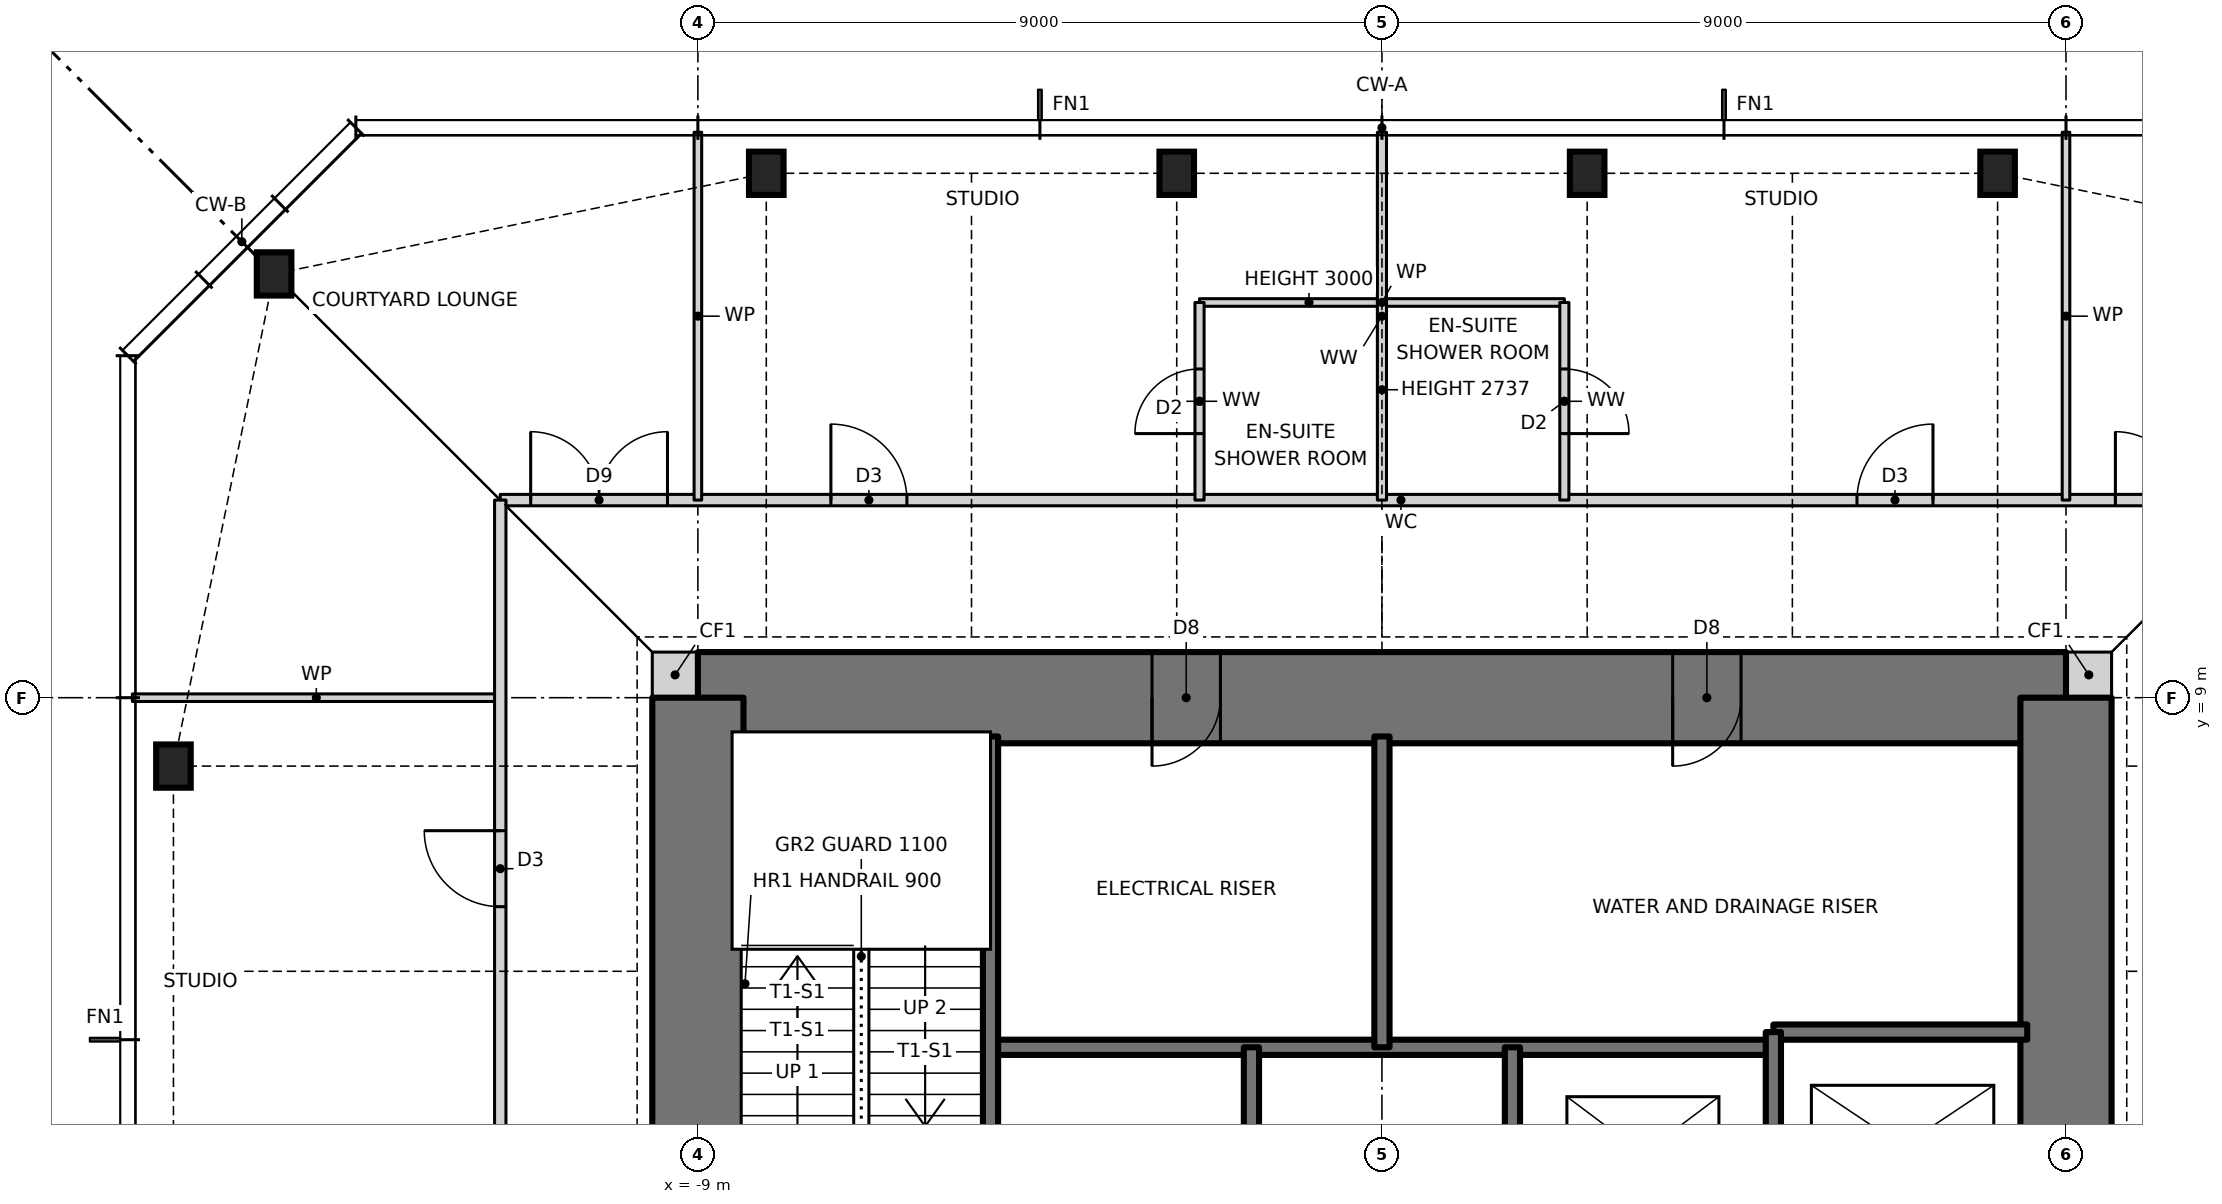
"""IFC4 building model, lengths in metres.
Left out: names, types, materials, properties, quantities, classifications, styles, units other than length and angle.
Written with IfcOpenShell. Run it as: python <this file> out.ifc"""

import sys

from ifc_helpers import new_model, si_unit, direction, frame, frame_2d, origin, origin_2d, place, context, subcontext, project, spatial, rectangle, i_section, extrude, element, fill, save


model = new_model("IFC4")
c1 = context("Model", 3, precision=1e-05, world=origin(), true_north=direction((0.0, 1.0)))
c2 = subcontext(c1, "Body", "Model", "MODEL_VIEW")
j1 = project(units=[si_unit("LENGTHUNIT", "METRE"), si_unit("PLANEANGLEUNIT", "RADIAN")], contexts=[c1])
p1 = place(None, origin())
s1 = spatial("IfcSite", under=j1, at=p1, CompositionType="ELEMENT")
p2 = place(p1, origin())
s2 = spatial("IfcBuilding", under=s1, at=p2, CompositionType="ELEMENT")
p3 = place(p2, frame((0.0, 0.0, 250.0)))
s3 = spatial("IfcBuildingStorey", under=s2, at=p3, CompositionType="ELEMENT", Elevation=250.0)
for number, where, z_axis, x_axis in (
    (1, (8.1, 15.9, 0.0), (0.0, 0.0, 1.0), (1.0, 0.0, 0.0)),
    (2, (2.7, 15.9, 0.0), (0.0, 0.0, 1.0), (1.0, 0.0, 0.0)),
    (3, (-2.7, 15.9, 0.0), (0.0, 0.0, 1.0), (1.0, 0.0, 0.0)),
    (4, (-8.1, 15.9, 0.0), (0.0, 0.0, 1.0), (1.0, 0.0, 0.0)),
    (5, (-14.576, 14.576, 0.0), (0.0, 0.0, 1.0), (1.0, 0.0, 0.0)),
    (6, (-15.9, 8.1, 0.0), (0.0, 0.0, 1.0), (1.0, 0.0, 0.0)),
):
    element("IfcColumn", number, at=place(p3, frame(where, z_axis=z_axis, x_axis=x_axis)), inside=s3, PredefinedType="COLUMN", context=c2, shape_type="SweptSolid", body=[
        extrude(i_section(OverallWidth=0.455, OverallDepth=0.569, WebThickness=0.078, FlangeThickness=0.125, at=origin_2d()), origin(), (0.0, 0.0, 1.0), 3.5),
    ])
for number, where, z_axis, x_axis in (
    (7, (9.0, 9.3, 0.0), (0.0, 0.0, 1.0), (1.0, 0.0, 0.0)),
    (8, (-9.6, 9.3, 0.0), (0.0, 0.0, 1.0), (1.0, 0.0, 0.0)),
):
    element("IfcWall", number, at=place(p3, frame(where, z_axis=z_axis, x_axis=x_axis)), inside=s3, PredefinedType="SOLIDWALL", context=c2, shape_type="SweptSolid", body=[
        extrude(rectangle(XDim=0.6, YDim=0.6, at=frame_2d((0.3, 0.0))), origin(), (0.0, 0.0, 1.0), 3.5),
    ])
p4 = place(p3, frame((9.0, 9.0, 0.0), z_axis=(0.0, 0.0, 1.0), x_axis=(-1.0, 0.0, 0.0)))
e9 = element("IfcWall", 9, at=p4, inside=s3, PredefinedType="SHEAR", context=c2, shape_type="SweptSolid", body=[
    extrude(rectangle(XDim=18.0, YDim=1.2, at=frame_2d((9.0, 0.0))), origin(), (0.0, 0.0, 1.0), 3.5),
])
p5 = place(p4, frame((11.125, 0.0, 0.0)))
e10 = element("IfcOpeningElement", 10, at=p5, cuts=e9, PredefinedType="OPENING", context=c2, shape_type="SweptSolid", body=[
    extrude(rectangle(XDim=0.9, YDim=2.1, at=frame_2d((0.45, 1.05))), frame((0.0, 0.61, 0.0), z_axis=(0.0, -1.0, 0.0), x_axis=(1.0, 0.0, 0.0)), (0.0, 0.0, 1.0), 1.22),
])
p6 = place(p4, frame((4.275, 0.0, 0.0)))
e11 = element("IfcOpeningElement", 11, at=p6, cuts=e9, PredefinedType="OPENING", context=c2, shape_type="SweptSolid", body=[
    extrude(rectangle(XDim=0.9, YDim=2.1, at=frame_2d((0.45, 1.05))), frame((0.0, 0.61, 0.0), z_axis=(0.0, -1.0, 0.0), x_axis=(1.0, 0.0, 0.0)), (0.0, 0.0, 1.0), 1.22),
])
p7 = place(p3, frame((9.0, -9.0, 0.0), z_axis=(0.0, 0.0, 1.0), x_axis=(0.0, 1.0, 0.0)))
e12 = element("IfcWall", 12, at=p7, inside=s3, PredefinedType="SHEAR", context=c2, shape_type="SweptSolid", body=[
    extrude(rectangle(XDim=18.0, YDim=1.2, at=frame_2d((9.0, 0.0))), origin(), (0.0, 0.0, 1.0), 3.5),
])
p8 = place(p7, frame((8.5, 0.0, 0.0)))
e13 = element("IfcOpeningElement", 13, at=p8, cuts=e12, PredefinedType="OPENING", context=c2, shape_type="SweptSolid", body=[
    extrude(rectangle(XDim=1.0, YDim=2.1, at=frame_2d((0.5, 1.05))), frame((0.0, 0.61, 0.0), z_axis=(0.0, -1.0, 0.0), x_axis=(1.0, 0.0, 0.0)), (0.0, 0.0, 1.0), 1.22),
])
p9 = place(p3, frame((-9.0, 9.0, 0.0), z_axis=(0.0, 0.0, 1.0), x_axis=(0.0, -1.0, 0.0)))
e14 = element("IfcWall", 14, at=p9, inside=s3, PredefinedType="SHEAR", context=c2, shape_type="SweptSolid", body=[
    extrude(rectangle(XDim=18.0, YDim=1.2, at=frame_2d((9.0, 0.0))), origin(), (0.0, 0.0, 1.0), 3.5),
])
p10 = place(p9, frame((8.5, 0.0, 0.0)))
e15 = element("IfcOpeningElement", 15, at=p10, cuts=e14, PredefinedType="OPENING", context=c2, shape_type="SweptSolid", body=[
    extrude(rectangle(XDim=1.0, YDim=2.1, at=frame_2d((0.5, 1.05))), frame((0.0, 0.61, 0.0), z_axis=(0.0, -1.0, 0.0), x_axis=(1.0, 0.0, 0.0)), (0.0, 0.0, 1.0), 1.22),
])
p11 = place(p3, frame((-5.15, 4.4, 0.0), z_axis=(0.0, 0.0, 1.0), x_axis=(1.0, 0.0, 0.0)))
e16 = element("IfcWall", 16, at=p11, inside=s3, PredefinedType="SOLIDWALL", context=c2, shape_type="SweptSolid", body=[
    extrude(rectangle(XDim=10.3, YDim=0.2, at=frame_2d((5.15, 0.0))), origin(), (0.0, 0.0, 1.0), 3.5),
])
p12 = place(p3, frame((5.15, 4.6, 0.0), z_axis=(0.0, 0.0, 1.0), x_axis=(1.0, 0.0, 0.0)))
e17 = element("IfcWall", 17, at=p12, inside=s3, PredefinedType="SOLIDWALL", context=c2, shape_type="SweptSolid", body=[
    extrude(rectangle(XDim=3.34, YDim=0.2, at=frame_2d((1.67, 0.0))), origin(), (0.0, 0.0, 1.0), 3.5),
])
p13 = place(p3, frame((-16.44, 9.0, 0.0), z_axis=(0.0, 0.0, 1.0), x_axis=(1.0, 0.0, 0.0)))
e18 = element("IfcWall", 18, at=p13, inside=s3, PredefinedType="PARTITIONING", context=c2, shape_type="SweptSolid", body=[
    extrude(rectangle(XDim=4.84, YDim=0.1, at=frame_2d((2.42, 0.0))), origin(), (0.0, 0.0, 1.0), 3.27),
])
p14 = place(p3, frame((-11.6, 11.6, 0.0), z_axis=(0.0, 0.0, 1.0), x_axis=(1.0, 0.0, 0.0)))
e19 = element("IfcWall", 19, at=p14, inside=s3, PredefinedType="PARTITIONING", context=c2, shape_type="SweptSolid", body=[
    extrude(rectangle(XDim=23.7, YDim=0.15, at=frame_2d((11.85, 0.0))), origin(), (0.0, 0.0, 1.0), 3.27),
])
p15 = place(p14, frame((17.85, 0.0, 0.0)))
e20 = element("IfcOpeningElement", 20, at=p15, cuts=e19, PredefinedType="OPENING", context=c2, shape_type="SweptSolid", body=[
    extrude(rectangle(XDim=1.0, YDim=2.1, at=frame_2d((0.5, 1.05))), frame((0.0, 0.085, 0.0), z_axis=(0.0, -1.0, 0.0), x_axis=(1.0, 0.0, 0.0)), (0.0, 0.0, 1.0), 0.17),
])
p16 = place(p14, frame((4.35, 0.0, 0.0)))
e21 = element("IfcOpeningElement", 21, at=p16, cuts=e19, PredefinedType="OPENING", context=c2, shape_type="SweptSolid", body=[
    extrude(rectangle(XDim=1.0, YDim=2.1, at=frame_2d((0.5, 1.05))), frame((0.0, 0.085, 0.0), z_axis=(0.0, -1.0, 0.0), x_axis=(1.0, 0.0, 0.0)), (0.0, 0.0, 1.0), 0.17),
])
p17 = place(p14, frame((0.4, 0.0, 0.0)))
e22 = element("IfcOpeningElement", 22, at=p17, cuts=e19, PredefinedType="OPENING", context=c2, shape_type="SweptSolid", body=[
    extrude(rectangle(XDim=1.8, YDim=2.1, at=frame_2d((0.9, 1.05))), frame((0.0, 0.085, 0.0), z_axis=(0.0, -1.0, 0.0), x_axis=(1.0, 0.0, 0.0)), (0.0, 0.0, 1.0), 0.17),
])
p18 = place(p14, frame((21.25, 0.0, 0.0)))
e23 = element("IfcOpeningElement", 23, at=p18, cuts=e19, PredefinedType="OPENING", context=c2, shape_type="SweptSolid", body=[
    extrude(rectangle(XDim=1.8, YDim=2.1, at=frame_2d((0.9, 1.05))), frame((0.0, 0.085, 0.0), z_axis=(0.0, -1.0, 0.0), x_axis=(1.0, 0.0, 0.0)), (0.0, 0.0, 1.0), 0.17),
])
p19 = place(p3, frame((-2.4, 14.2, 0.0), z_axis=(0.0, 0.0, 1.0), x_axis=(1.0, 0.0, 0.0)))
e24 = element("IfcWall", 24, at=p19, inside=s3, PredefinedType="PARTITIONING", context=c2, shape_type="SweptSolid", body=[
    extrude(rectangle(XDim=4.8, YDim=0.1, at=frame_2d((2.4, 0.0))), origin(), (0.0, 0.0, 1.0), 3.0),
])
p20 = place(p3, frame((9.0, 11.6, 0.0), z_axis=(0.0, 0.0, 1.0), x_axis=(0.0, 1.0, 0.0)))
e25 = element("IfcWall", 25, at=p20, inside=s3, PredefinedType="PARTITIONING", context=c2, shape_type="SweptSolid", body=[
    extrude(rectangle(XDim=4.84, YDim=0.1, at=frame_2d((2.42, 0.0))), origin(), (0.0, 0.0, 1.0), 3.27),
])
p21 = place(p3, frame((5.15, -8.49, 0.0), z_axis=(0.0, 0.0, 1.0), x_axis=(0.0, 1.0, 0.0)))
e26 = element("IfcWall", 26, at=p21, inside=s3, PredefinedType="SOLIDWALL", context=c2, shape_type="SweptSolid", body=[
    extrude(rectangle(XDim=13.09, YDim=0.2, at=frame_2d((6.545, 0.0))), origin(), (0.0, 0.0, 1.0), 3.5),
])
p22 = place(p21, frame((7.89, 0.0, 0.0)))
e27 = element("IfcOpeningElement", 27, at=p22, cuts=e26, PredefinedType="OPENING", context=c2, shape_type="SweptSolid", body=[
    extrude(rectangle(XDim=1.2, YDim=2.1, at=frame_2d((0.6, 1.05))), frame((0.0, 0.11, 0.0), z_axis=(0.0, -1.0, 0.0), x_axis=(1.0, 0.0, 0.0)), (0.0, 0.0, 1.0), 0.22),
])
p23 = place(p3, frame((2.4, 11.6, 0.0), z_axis=(0.0, 0.0, 1.0), x_axis=(0.0, 1.0, 0.0)))
e28 = element("IfcWall", 28, at=p23, inside=s3, PredefinedType="PARTITIONING", context=c2, shape_type="SweptSolid", body=[
    extrude(rectangle(XDim=2.6, YDim=0.12, at=frame_2d((1.3, 0.0))), origin(), (0.0, 0.0, 1.0), 3.27),
])
p24 = place(p23, frame((0.875, 0.0, 0.0)))
e29 = element("IfcOpeningElement", 29, at=p24, cuts=e28, PredefinedType="OPENING", context=c2, shape_type="SweptSolid", body=[
    extrude(rectangle(XDim=0.85, YDim=2.1, at=frame_2d((0.425, 1.05))), frame((0.0, 0.07, 0.0), z_axis=(0.0, -1.0, 0.0), x_axis=(1.0, 0.0, 0.0)), (0.0, 0.0, 1.0), 0.14),
])
p25 = place(p3, frame((1.717, 1.6, 0.0), z_axis=(0.0, 0.0, 1.0), x_axis=(0.0, 1.0, 0.0)))
e30 = element("IfcWall", 30, at=p25, inside=s3, PredefinedType="SOLIDWALL", context=c2, shape_type="SweptSolid", body=[
    extrude(rectangle(XDim=2.8, YDim=0.2, at=frame_2d((1.4, 0.0))), origin(), (0.0, 0.0, 1.0), 3.5),
])
p26 = place(p3, frame((0.0, 4.4, 0.0), z_axis=(0.0, 0.0, 1.0), x_axis=(0.0, 1.0, 0.0)))
e31 = element("IfcWall", 31, at=p26, inside=s3, PredefinedType="SOLIDWALL", context=c2, shape_type="SweptSolid", body=[
    extrude(rectangle(XDim=4.09, YDim=0.2, at=frame_2d((2.045, 0.0))), origin(), (0.0, 0.0, 1.0), 3.5),
])
p27 = place(p3, frame((0.0, 11.6, 0.0), z_axis=(0.0, 0.0, 1.0), x_axis=(0.0, 1.0, 0.0)))
e32 = element("IfcWall", 32, at=p27, inside=s3, PredefinedType="PARTITIONING", context=c2, shape_type="SweptSolid", body=[
    extrude(rectangle(XDim=4.84, YDim=0.12, at=frame_2d((2.42, 0.0))), origin(), (0.0, 0.0, 1.0), 2.737),
])
p28 = place(p3, frame((-1.717, 1.6, 0.0), z_axis=(0.0, 0.0, 1.0), x_axis=(0.0, 1.0, 0.0)))
e33 = element("IfcWall", 33, at=p28, inside=s3, PredefinedType="SOLIDWALL", context=c2, shape_type="SweptSolid", body=[
    extrude(rectangle(XDim=2.8, YDim=0.2, at=frame_2d((1.4, 0.0))), origin(), (0.0, 0.0, 1.0), 3.5),
])
p29 = place(p3, frame((-2.4, 11.6, 0.0), z_axis=(0.0, 0.0, 1.0), x_axis=(0.0, 1.0, 0.0)))
e34 = element("IfcWall", 34, at=p29, inside=s3, PredefinedType="PARTITIONING", context=c2, shape_type="SweptSolid", body=[
    extrude(rectangle(XDim=2.6, YDim=0.12, at=frame_2d((1.3, 0.0))), origin(), (0.0, 0.0, 1.0), 3.27),
])
p30 = place(p29, frame((0.875, 0.0, 0.0)))
e35 = element("IfcOpeningElement", 35, at=p30, cuts=e34, PredefinedType="OPENING", context=c2, shape_type="SweptSolid", body=[
    extrude(rectangle(XDim=0.85, YDim=2.1, at=frame_2d((0.425, 1.05))), frame((0.0, 0.07, 0.0), z_axis=(0.0, -1.0, 0.0), x_axis=(1.0, 0.0, 0.0)), (0.0, 0.0, 1.0), 0.14),
])
p31 = place(p3, frame((-5.15, 1.6, 0.0), z_axis=(0.0, 0.0, 1.0), x_axis=(0.0, 1.0, 0.0)))
e36 = element("IfcWall", 36, at=p31, inside=s3, PredefinedType="SOLIDWALL", context=c2, shape_type="SweptSolid", body=[
    extrude(rectangle(XDim=6.89, YDim=0.2, at=frame_2d((3.445, 0.0))), origin(), (0.0, 0.0, 1.0), 3.5),
])
p32 = place(p3, frame((-9.0, 11.6, 0.0), z_axis=(0.0, 0.0, 1.0), x_axis=(0.0, 1.0, 0.0)))
e37 = element("IfcWall", 37, at=p32, inside=s3, PredefinedType="PARTITIONING", context=c2, shape_type="SweptSolid", body=[
    extrude(rectangle(XDim=4.84, YDim=0.1, at=frame_2d((2.42, 0.0))), origin(), (0.0, 0.0, 1.0), 3.27),
])
p33 = place(p3, frame((-11.6, -11.6, 0.0), z_axis=(0.0, 0.0, 1.0), x_axis=(0.0, 1.0, 0.0)))
e38 = element("IfcWall", 38, at=p33, inside=s3, PredefinedType="PARTITIONING", context=c2, shape_type="SweptSolid", body=[
    extrude(rectangle(XDim=23.2, YDim=0.15, at=frame_2d((11.6, 0.0))), origin(), (0.0, 0.0, 1.0), 3.27),
])
p34 = place(p33, frame((17.85, 0.0, 0.0)))
e39 = element("IfcOpeningElement", 39, at=p34, cuts=e38, PredefinedType="OPENING", context=c2, shape_type="SweptSolid", body=[
    extrude(rectangle(XDim=1.0, YDim=2.1, at=frame_2d((0.5, 1.05))), frame((0.0, 0.085, 0.0), z_axis=(0.0, -1.0, 0.0), x_axis=(1.0, 0.0, 0.0)), (0.0, 0.0, 1.0), 0.17),
])
p35 = place(p33, frame((4.35, 0.0, 0.0)))
e40 = element("IfcOpeningElement", 40, at=p35, cuts=e38, PredefinedType="OPENING", context=c2, shape_type="SweptSolid", body=[
    extrude(rectangle(XDim=1.0, YDim=2.1, at=frame_2d((0.5, 1.05))), frame((0.0, 0.085, 0.0), z_axis=(0.0, -1.0, 0.0), x_axis=(1.0, 0.0, 0.0)), (0.0, 0.0, 1.0), 0.17),
])
p36 = place(p33, frame((0.4, 0.0, 0.0)))
e41 = element("IfcOpeningElement", 41, at=p36, cuts=e38, PredefinedType="OPENING", context=c2, shape_type="SweptSolid", body=[
    extrude(rectangle(XDim=1.8, YDim=2.1, at=frame_2d((0.9, 1.05))), frame((0.0, 0.085, 0.0), z_axis=(0.0, -1.0, 0.0), x_axis=(1.0, 0.0, 0.0)), (0.0, 0.0, 1.0), 0.17),
])
p37 = place(p15, origin())
e42 = element("IfcDoor", 42, at=p37, inside=s3, OperationType="SINGLE_SWING_RIGHT", PredefinedType="DOOR", context=c2, shape_type="SweptSolid", body=[
    extrude(rectangle(XDim=1.0, YDim=2.1, at=frame_2d((0.5, 1.05))), frame((0.0, 0.025, 0.0), z_axis=(0.0, -1.0, 0.0), x_axis=(1.0, 0.0, 0.0)), (0.0, 0.0, 1.0), 0.05),
])
fill(e20, e42)
p38 = place(p24, frame((0.85, 0.0, 0.0), z_axis=(0.0, 0.0, 1.0), x_axis=(-1.0, 0.0, 0.0)))
e43 = element("IfcDoor", 43, at=p38, inside=s3, OperationType="SINGLE_SWING_RIGHT", PredefinedType="DOOR", context=c2, shape_type="SweptSolid", body=[
    extrude(rectangle(XDim=0.85, YDim=2.1, at=frame_2d((0.425, 1.05))), frame((0.0, 0.025, 0.0), z_axis=(0.0, -1.0, 0.0), x_axis=(1.0, 0.0, 0.0)), (0.0, 0.0, 1.0), 0.05),
])
fill(e29, e43)
p39 = place(p16, origin())
e44 = element("IfcDoor", 44, at=p39, inside=s3, OperationType="SINGLE_SWING_LEFT", PredefinedType="DOOR", context=c2, shape_type="SweptSolid", body=[
    extrude(rectangle(XDim=1.0, YDim=2.1, at=frame_2d((0.5, 1.05))), frame((0.0, 0.025, 0.0), z_axis=(0.0, -1.0, 0.0), x_axis=(1.0, 0.0, 0.0)), (0.0, 0.0, 1.0), 0.05),
])
fill(e21, e44)
p40 = place(p30, origin())
e45 = element("IfcDoor", 45, at=p40, inside=s3, OperationType="SINGLE_SWING_LEFT", PredefinedType="DOOR", context=c2, shape_type="SweptSolid", body=[
    extrude(rectangle(XDim=0.85, YDim=2.1, at=frame_2d((0.425, 1.05))), frame((0.0, 0.025, 0.0), z_axis=(0.0, -1.0, 0.0), x_axis=(1.0, 0.0, 0.0)), (0.0, 0.0, 1.0), 0.05),
])
fill(e35, e45)
p41 = place(p34, origin())
e46 = element("IfcDoor", 46, at=p41, inside=s3, OperationType="SINGLE_SWING_RIGHT", PredefinedType="DOOR", context=c2, shape_type="SweptSolid", body=[
    extrude(rectangle(XDim=1.0, YDim=2.1, at=frame_2d((0.5, 1.05))), frame((0.0, 0.025, 0.0), z_axis=(0.0, -1.0, 0.0), x_axis=(1.0, 0.0, 0.0)), (0.0, 0.0, 1.0), 0.05),
])
fill(e39, e46)
p42 = place(p17, origin())
e47 = element("IfcDoor", 47, at=p42, inside=s3, OperationType="DOUBLE_DOOR_SINGLE_SWING", PredefinedType="DOOR", context=c2, shape_type="SweptSolid", body=[
    extrude(rectangle(XDim=1.8, YDim=2.1, at=frame_2d((0.9, 1.05))), frame((0.0, 0.025, 0.0), z_axis=(0.0, -1.0, 0.0), x_axis=(1.0, 0.0, 0.0)), (0.0, 0.0, 1.0), 0.05),
])
fill(e22, e47)
p43 = place(p18, origin())
e48 = element("IfcDoor", 48, at=p43, inside=s3, OperationType="DOUBLE_DOOR_SINGLE_SWING", PredefinedType="DOOR", context=c2, shape_type="SweptSolid", body=[
    extrude(rectangle(XDim=1.8, YDim=2.1, at=frame_2d((0.9, 1.05))), frame((0.0, 0.025, 0.0), z_axis=(0.0, -1.0, 0.0), x_axis=(1.0, 0.0, 0.0)), (0.0, 0.0, 1.0), 0.05),
])
fill(e23, e48)
p44 = place(p5, origin())
e49 = element("IfcDoor", 49, at=p44, inside=s3, OperationType="SINGLE_SWING_RIGHT", PredefinedType="DOOR", context=c2, shape_type="SweptSolid", body=[
    extrude(rectangle(XDim=0.9, YDim=2.1, at=frame_2d((0.45, 1.05))), frame((0.0, 0.025, 0.0), z_axis=(0.0, -1.0, 0.0), x_axis=(1.0, 0.0, 0.0)), (0.0, 0.0, 1.0), 0.05),
])
fill(e10, e49)
p45 = place(p6, origin())
e50 = element("IfcDoor", 50, at=p45, inside=s3, OperationType="SINGLE_SWING_RIGHT", PredefinedType="DOOR", context=c2, shape_type="SweptSolid", body=[
    extrude(rectangle(XDim=0.9, YDim=2.1, at=frame_2d((0.45, 1.05))), frame((0.0, 0.025, 0.0), z_axis=(0.0, -1.0, 0.0), x_axis=(1.0, 0.0, 0.0)), (0.0, 0.0, 1.0), 0.05),
])
fill(e11, e50)
save(model, sys.argv[1])
